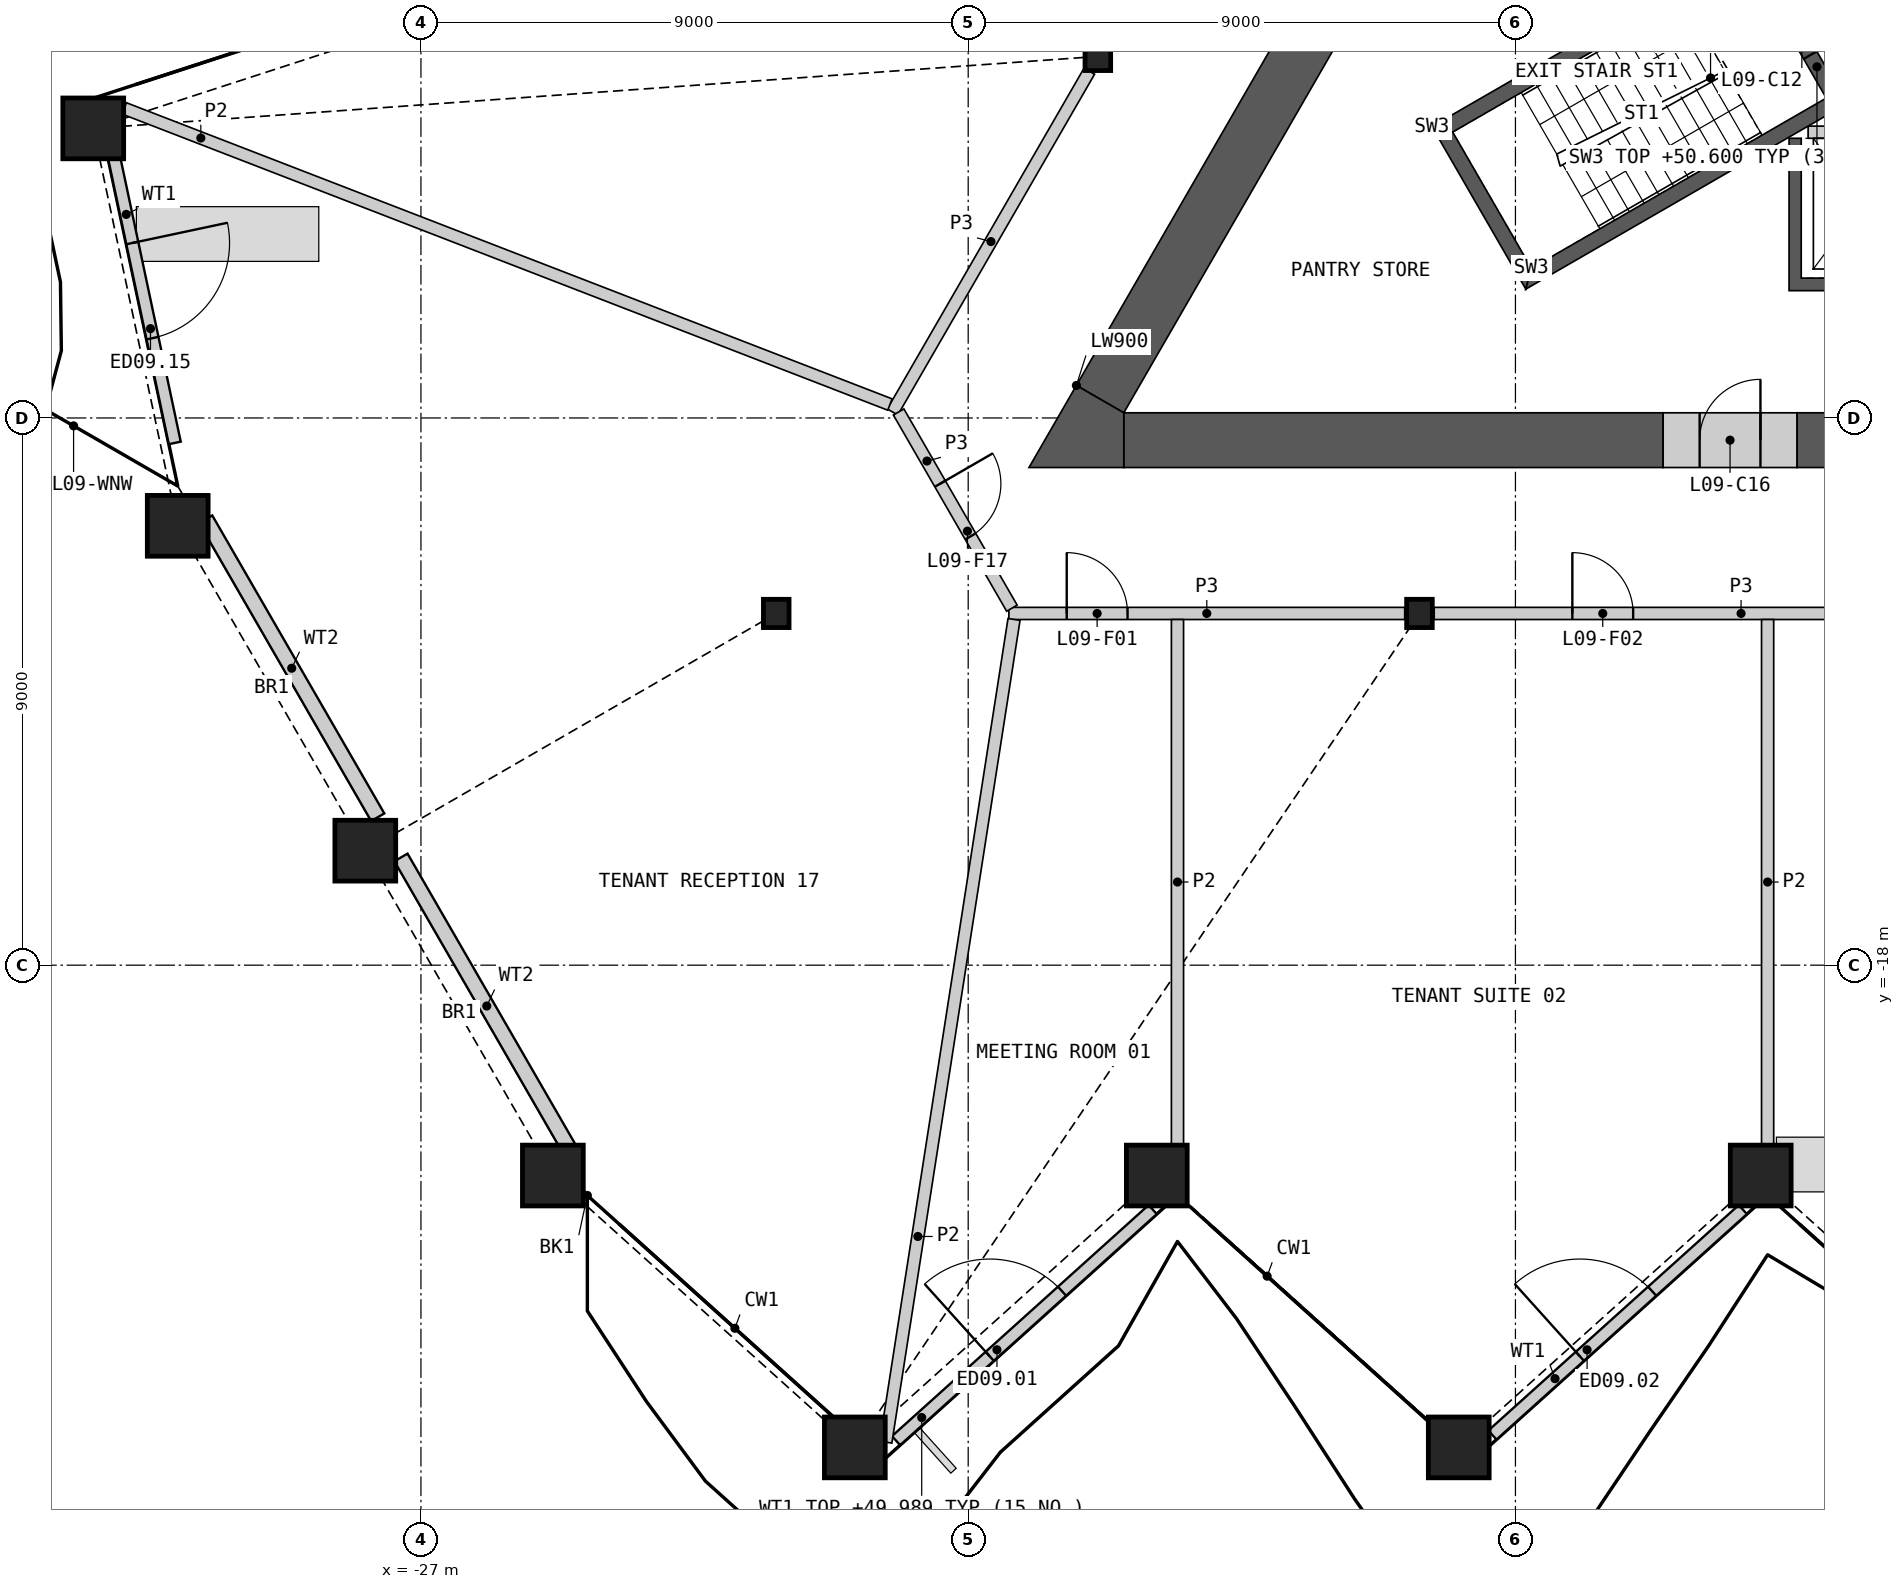
"""IFC4 building model, lengths in metres.
Left out: names, types, materials, properties, quantities, classifications, styles, units other than length and angle.
Written with IfcOpenShell. Run it as: python <this file> out.ifc"""

import sys

from ifc_helpers import new_model, si_unit, direction, frame, frame_2d, origin, origin_2d, place, context, subcontext, project, spatial, polyline, rectangle, hollow_rectangle, i_section, outline, extrude, element, fill, save


model = new_model("IFC4")
c1 = context("Model", 3, precision=1e-05, world=origin(), true_north=direction((0.0, 1.0)))
c2 = subcontext(c1, "Body", "Model", "MODEL_VIEW")
j1 = project(units=[si_unit("LENGTHUNIT", "METRE"), si_unit("PLANEANGLEUNIT", "RADIAN")], contexts=[c1])
p1 = place(None, origin())
s1 = spatial("IfcSite", under=j1, at=p1, CompositionType="ELEMENT")
p2 = place(p1, origin())
s2 = spatial("IfcBuilding", under=s1, at=p2, CompositionType="ELEMENT")
p3 = place(p2, frame((0.0, 0.0, 46.8)))
s3 = spatial("IfcBuildingStorey", under=s2, at=p3, CompositionType="ELEMENT", Elevation=46.8)
for number, where, z_axis, x_axis in (
    (1, (-24.83, -21.46, 0.0), (0.0, 0.0, 1.0), (1.0, 0.0, 0.0)),
    (2, (-19.864, -25.931, 0.0), (0.0, 0.0, 1.0), (1.0, 0.0, 0.0)),
    (3, (-14.898, -21.46, 0.0), (0.0, 0.0, 1.0), (1.0, 0.0, 0.0)),
    (4, (-9.932, -25.931, 0.0), (0.0, 0.0, 1.0), (1.0, 0.0, 0.0)),
    (5, (-4.966, -21.46, 0.0), (0.0, 0.0, 1.0), (1.0, 0.0, 0.0)),
    (6, (-32.389, -4.237, 0.0), (0.0, 0.0, 1.0), (1.0, 0.0, 0.0)),
    (7, (-31.0, -10.774, 0.0), (0.0, 0.0, 1.0), (1.0, 0.0, 0.0)),
    (8, (-27.915, -16.117, 0.0), (0.0, 0.0, 1.0), (1.0, 0.0, 0.0)),
):
    element("IfcColumn", number, at=place(p3, frame(where, z_axis=z_axis, x_axis=x_axis)), inside=s3, PredefinedType="COLUMN", context=c2, shape_type="SweptSolid", body=[
        extrude(hollow_rectangle(XDim=1.0, YDim=1.0, WallThickness=0.07, at=origin_2d()), origin(), (0.0, 0.0, 1.0), 4.2),
    ])
for number, where, z_axis, x_axis in (
    (9, (-15.868, -3.054, 0.0), (0.0, 0.0, 1.0), (1.0, 0.0, 0.0)),
    (10, (-21.157, -12.215, 0.0), (0.0, 0.0, 1.0), (1.0, 0.0, 0.0)),
    (11, (-10.578, -12.215, 0.0), (0.0, 0.0, 1.0), (1.0, 0.0, 0.0)),
):
    element("IfcColumn", number, at=place(p3, frame(where, z_axis=z_axis, x_axis=x_axis)), inside=s3, PredefinedType="COLUMN", context=c2, shape_type="SweptSolid", body=[
        extrude(i_section(OverallWidth=0.421, OverallDepth=0.465, WebThickness=0.045, FlangeThickness=0.072, at=origin_2d()), origin(), (0.0, 0.0, 1.0), 4.2),
    ])
p4 = place(p3, frame((-19.187, -25.82, 0.0), z_axis=(0.0, 0.0, 1.0), x_axis=(0.743142396166, 0.669133304373, 0.0)))
e12 = element("IfcWall", 12, at=p4, inside=s3, PredefinedType="SOLIDWALL", context=c2, shape_type="SweptSolid", body=[
    extrude(rectangle(XDim=5.68, YDim=0.2, at=frame_2d((2.84, 0.0))), origin(), (0.0, 0.0, 1.0), 3.189),
])
p5 = place(p4, frame((2.073, 0.0, 0.0)))
e13 = element("IfcOpeningElement", 13, at=p5, cuts=e12, PredefinedType="OPENING", context=c2, shape_type="SweptSolid", body=[
    extrude(rectangle(XDim=1.6, YDim=2.4, at=frame_2d((0.8, 1.2))), frame((0.0, 0.11, 0.0), z_axis=(0.0, -1.0, 0.0), x_axis=(1.0, 0.0, 0.0)), (0.0, 0.0, 1.0), 0.22),
])
p6 = place(p3, frame((-9.379, -25.728, 0.0), z_axis=(0.0, 0.0, 1.0), x_axis=(0.743160522465, 0.669113172677, 0.0)))
e14 = element("IfcWall", 14, at=p6, inside=s3, PredefinedType="SOLIDWALL", context=c2, shape_type="SweptSolid", body=[
    extrude(rectangle(XDim=5.542, YDim=0.2, at=frame_2d((2.771, 0.0))), origin(), (0.0, 0.0, 1.0), 3.189),
])
p7 = place(p6, frame((1.935, 0.0, 0.0)))
e15 = element("IfcOpeningElement", 15, at=p7, cuts=e14, PredefinedType="OPENING", context=c2, shape_type="SweptSolid", body=[
    extrude(rectangle(XDim=1.6, YDim=2.4, at=frame_2d((0.8, 1.2))), frame((0.0, 0.11, 0.0), z_axis=(0.0, -1.0, 0.0), x_axis=(1.0, 0.0, 0.0)), (0.0, 0.0, 1.0), 0.22),
])
p8 = place(p3, frame((-32.114, -4.399, 0.0), z_axis=(0.0, 0.0, 1.0), x_axis=(0.207931126702, -0.978143469307, 0.0)))
e16 = element("IfcWall", 16, at=p8, inside=s3, PredefinedType="SOLIDWALL", context=c2, shape_type="SweptSolid", body=[
    extrude(rectangle(XDim=5.124, YDim=0.2, at=frame_2d((2.562, 0.0))), origin(), (0.0, 0.0, 1.0), 3.189),
])
p9 = place(p8, frame((1.762, 0.0, 0.0)))
e17 = element("IfcOpeningElement", 17, at=p9, cuts=e16, PredefinedType="OPENING", context=c2, shape_type="SweptSolid", body=[
    extrude(rectangle(XDim=1.6, YDim=2.4, at=frame_2d((0.8, 1.2))), frame((0.0, 0.11, 0.0), z_axis=(0.0, -1.0, 0.0), x_axis=(1.0, 0.0, 0.0)), (0.0, 0.0, 1.0), 0.22),
])
p10 = place(p3, frame((-30.54, -10.665, 0.0), z_axis=(0.0, 0.0, 1.0), x_axis=(0.499985074313, -0.866034020963, 0.0)))
e18 = element("IfcWall", 18, at=p10, inside=s3, PredefinedType="SOLIDWALL", context=c2, shape_type="SweptSolid", body=[
    extrude(rectangle(XDim=5.66, YDim=0.25, at=frame_2d((2.83, 0.0))), origin(), (0.0, 0.0, 1.0), 3.189),
])
p11 = place(p3, frame((-27.329, -16.228, 0.0), z_axis=(0.0, 0.0, 1.0), x_axis=(0.49999579099, -0.866027833844, 0.0)))
e19 = element("IfcWall", 19, at=p11, inside=s3, PredefinedType="SOLIDWALL", context=c2, shape_type="SweptSolid", body=[
    extrude(rectangle(XDim=5.644, YDim=0.25, at=frame_2d((2.822, 0.0))), origin(), (0.0, 0.0, 1.0), 3.189),
])
p12 = place(p3, origin())
e20 = element("IfcWall", 20, at=p12, inside=s3, PredefinedType="SHEAR", context=c2, shape_type="SweptSolid", body=[
    extrude(outline(polyline([(4.5, -4.4), (4.5, -6.906), (-4.5, -6.906), (-4.5, -4.4), (-4.3, -4.4), (-4.3, -6.7), (-2.3, -6.7), (-2.3, -4.4), (-2.1, -4.4), (-2.1, -6.7), (-0.1, -6.7), (-0.1, -4.4), (0.1, -4.4), (0.1, -6.7), (2.1, -6.7), (2.1, -4.4), (2.3, -4.4), (2.3, -6.7), (4.3, -6.7), (4.3, -4.4), (4.5, -4.4)])), origin(), (0.0, 0.0, 1.0), 3.8),
])
p13 = place(p3, frame((-4.187, -4.3, 0.0), z_axis=(0.0, 0.0, 1.0), x_axis=(1.0, 0.0, 0.0)))
e21 = element("IfcWall", 21, at=p13, inside=s3, PredefinedType="SOLIDWALL", context=c2, shape_type="SweptSolid", body=[
    extrude(rectangle(XDim=8.373, YDim=0.2, at=frame_2d((4.187, 0.0))), origin(), (0.0, 0.0, 1.0), 3.8),
])
p14 = place(p13, frame((0.287, 0.0, 0.0)))
e22 = element("IfcOpeningElement", 22, at=p14, cuts=e21, PredefinedType="OPENING", context=c2, shape_type="SweptSolid", body=[
    extrude(rectangle(XDim=1.2, YDim=2.1, at=frame_2d((0.6, 1.05))), frame((0.0, 0.11, 0.0), z_axis=(0.0, -1.0, 0.0), x_axis=(1.0, 0.0, 0.0)), (0.0, 0.0, 1.0), 0.22),
])
p15 = place(p13, frame((2.387, 0.0, 0.0)))
e23 = element("IfcOpeningElement", 23, at=p15, cuts=e21, PredefinedType="OPENING", context=c2, shape_type="SweptSolid", body=[
    extrude(rectangle(XDim=1.4, YDim=2.1, at=frame_2d((0.7, 1.05))), frame((0.0, 0.11, 0.0), z_axis=(0.0, -1.0, 0.0), x_axis=(1.0, 0.0, 0.0)), (0.0, 0.0, 1.0), 0.22),
])
p16 = place(p13, frame((4.737, 0.0, 0.0)))
e24 = element("IfcOpeningElement", 24, at=p16, cuts=e21, PredefinedType="OPENING", context=c2, shape_type="SweptSolid", body=[
    extrude(rectangle(XDim=1.1, YDim=2.1, at=frame_2d((0.55, 1.05))), frame((0.0, 0.11, 0.0), z_axis=(0.0, -1.0, 0.0), x_axis=(1.0, 0.0, 0.0)), (0.0, 0.0, 1.0), 0.22),
])
p17 = place(p13, frame((6.887, 0.0, 0.0)))
e25 = element("IfcOpeningElement", 25, at=p17, cuts=e21, PredefinedType="OPENING", context=c2, shape_type="SweptSolid", body=[
    extrude(rectangle(XDim=1.2, YDim=2.1, at=frame_2d((0.6, 1.05))), frame((0.0, 0.11, 0.0), z_axis=(0.0, -1.0, 0.0), x_axis=(1.0, 0.0, 0.0)), (0.0, 0.0, 1.0), 0.22),
])
p18 = place(p3, origin())
e26 = element("IfcWall", 26, at=p18, inside=s3, PredefinedType="SHEAR", context=c2, shape_type="SweptSolid", body=[
    extrude(outline(polyline([(-5.307, -1.281), (-10.374, -4.206), (-10.032, -4.298), (-5.182, -1.498), (-5.307, -1.281)])), origin(), (0.0, 0.0, 1.0), 3.8),
])
p19 = place(p3, origin())
e27 = element("IfcWall", 27, at=p19, inside=s3, PredefinedType="SHEAR", context=c2, shape_type="SweptSolid", body=[
    extrude(outline(polyline([(-10.374, -4.206), (-8.83, -6.881), (-8.738, -6.539), (-10.032, -4.298), (-10.374, -4.206)])), origin(), (0.0, 0.0, 1.0), 3.8),
])
p20 = place(p3, origin())
e28 = element("IfcWall", 28, at=p20, inside=s3, PredefinedType="SHEAR", context=c2, shape_type="SweptSolid", body=[
    extrude(outline(polyline([(-8.738, -6.539), (-8.83, -6.881), (-3.763, -3.956), (-3.888, -3.739), (-8.738, -6.539)])), origin(), (0.0, 0.0, 1.0), 3.8),
])
p21 = place(p3, frame((-5.199, -1.219, 0.0), z_axis=(0.0, 0.0, 1.0), x_axis=(0.499982516597, -0.866035497597, 0.0)))
e29 = element("IfcWall", 29, at=p21, inside=s3, PredefinedType="SHEAR", context=c2, shape_type="SweptSolid", body=[
    extrude(rectangle(XDim=3.088, YDim=0.25, at=frame_2d((1.544, 0.0))), origin(), (0.0, 0.0, 1.0), 3.8),
])
p22 = place(p21, frame((0.994, 0.0, 0.0)))
e30 = element("IfcOpeningElement", 30, at=p22, cuts=e29, PredefinedType="OPENING", context=c2, shape_type="SweptSolid", body=[
    extrude(rectangle(XDim=1.1, YDim=2.1, at=frame_2d((0.55, 1.05))), frame((0.0, 0.135, 0.0), z_axis=(0.0, -1.0, 0.0), x_axis=(1.0, 0.0, 0.0)), (0.0, 0.0, 1.0), 0.27),
])
p23 = place(p3, frame((-4.371, -9.365, 0.0), z_axis=(0.0, 0.0, 1.0), x_axis=(1.0, 0.0, 0.0)))
e31 = element("IfcWall", 31, at=p23, inside=s3, PredefinedType="SHEAR", context=c2, shape_type="SweptSolid", body=[
    extrude(rectangle(XDim=15.55, YDim=0.9, at=frame_2d((7.775, 0.0))), origin(), (0.0, 0.0, 1.0), 3.8),
])
p24 = place(p3, frame((-15.441, -9.365, 0.0), z_axis=(0.0, 0.0, 1.0), x_axis=(1.0, 0.0, 0.0)))
e32 = element("IfcWall", 32, at=p24, inside=s3, PredefinedType="SHEAR", context=c2, shape_type="SweptSolid", body=[
    extrude(rectangle(XDim=8.871, YDim=0.9, at=frame_2d((4.435, 0.0))), origin(), (0.0, 0.0, 1.0), 3.8),
])
p25 = place(p3, frame((-10.31, 0.872, 0.0), z_axis=(0.0, 0.0, 1.0), x_axis=(-0.499991697393, -0.866030197244, 0.0)))
e33 = element("IfcWall", 33, at=p25, inside=s3, PredefinedType="SHEAR", context=c2, shape_type="SweptSolid", body=[
    extrude(rectangle(XDim=11.041, YDim=0.9, at=frame_2d((5.521, 0.0))), origin(), (0.0, 0.0, 1.0), 3.8),
])
p26 = place(p3, origin())
e34 = element("IfcWall", 34, at=p26, inside=s3, PredefinedType="SHEAR", context=c2, shape_type="SweptSolid", body=[
    extrude(outline(polyline([(-16.221, -8.465), (-15.441, -8.915), (-15.441, -9.815), (-17.0, -9.815), (-16.221, -8.465)])), origin(), (0.0, 0.0, 1.0), 3.8),
])
p27 = place(p3, frame((-6.571, -9.365, 0.0), z_axis=(0.0, 0.0, 1.0), x_axis=(1.0, 0.0, 0.0)))
e35 = element("IfcWall", 35, at=p27, inside=s3, PredefinedType="SHEAR", context=c2, shape_type="SweptSolid", body=[
    extrude(rectangle(XDim=2.2, YDim=0.9, at=frame_2d((1.1, 0.0))), origin(), (0.0, 0.0, 1.0), 3.8),
])
p28 = place(p27, frame((0.6, 0.0, 0.0)))
e36 = element("IfcOpeningElement", 36, at=p28, cuts=e35, PredefinedType="OPENING", context=c2, shape_type="SweptSolid", body=[
    extrude(rectangle(XDim=1.0, YDim=2.1, at=frame_2d((0.5, 1.05))), frame((0.0, 0.46, 0.0), z_axis=(0.0, -1.0, 0.0), x_axis=(1.0, 0.0, 0.0)), (0.0, 0.0, 1.0), 0.92),
])
p29 = place(p3, frame((-10.336, -12.215, 0.0), z_axis=(0.0, 0.0, 1.0), x_axis=(1.0, 0.0, 0.0)))
e37 = element("IfcWall", 37, at=p29, inside=s3, PredefinedType="PARTITIONING", context=c2, shape_type="SweptSolid", body=[
    extrude(rectangle(XDim=10.094, YDim=0.2, at=frame_2d((5.047, 0.0))), origin(), (0.0, 0.0, 1.0), 3.8),
])
p30 = place(p29, frame((2.272, 0.0, 0.0)))
e38 = element("IfcOpeningElement", 38, at=p30, cuts=e37, PredefinedType="OPENING", context=c2, shape_type="SweptSolid", body=[
    extrude(rectangle(XDim=1.0, YDim=2.1, at=frame_2d((0.5, 1.05))), frame((0.0, 0.11, 0.0), z_axis=(0.0, -1.0, 0.0), x_axis=(1.0, 0.0, 0.0)), (0.0, 0.0, 1.0), 0.22),
])
p31 = place(p3, frame((-17.331, -12.215, 0.0), z_axis=(0.0, 0.0, 1.0), x_axis=(1.0, 0.0, 0.0)))
e39 = element("IfcWall", 39, at=p31, inside=s3, PredefinedType="PARTITIONING", context=c2, shape_type="SweptSolid", body=[
    extrude(rectangle(XDim=6.51, YDim=0.2, at=frame_2d((3.255, 0.0))), origin(), (0.0, 0.0, 1.0), 3.8),
])
p32 = place(p31, frame((0.951, 0.0, 0.0)))
e40 = element("IfcOpeningElement", 40, at=p32, cuts=e39, PredefinedType="OPENING", context=c2, shape_type="SweptSolid", body=[
    extrude(rectangle(XDim=1.0, YDim=2.1, at=frame_2d((0.5, 1.05))), frame((0.0, 0.11, 0.0), z_axis=(0.0, -1.0, 0.0), x_axis=(1.0, 0.0, 0.0)), (0.0, 0.0, 1.0), 0.22),
])
p33 = place(p3, frame((-19.244, -8.902, 0.0), z_axis=(0.0, 0.0, 1.0), x_axis=(0.499984737558, 0.86603421538, 0.0)))
e41 = element("IfcWall", 41, at=p33, inside=s3, PredefinedType="PARTITIONING", context=c2, shape_type="SweptSolid", body=[
    extrude(rectangle(XDim=6.473, YDim=0.2, at=frame_2d((3.236, 0.0))), origin(), (0.0, 0.0, 1.0), 3.8),
])
p34 = place(p3, frame((-19.144, -8.902, 0.0), z_axis=(0.0, 0.0, 1.0), x_axis=(0.499958791762, -0.866049194065, 0.0)))
e42 = element("IfcWall", 42, at=p34, inside=s3, PredefinedType="PARTITIONING", context=c2, shape_type="SweptSolid", body=[
    extrude(rectangle(XDim=3.726, YDim=0.2, at=frame_2d((1.863, 0.0))), origin(), (0.0, 0.0, 1.0), 3.8),
])
p35 = place(p34, frame((1.363, 0.0, 0.0)))
e43 = element("IfcOpeningElement", 43, at=p35, cuts=e42, PredefinedType="OPENING", context=c2, shape_type="SweptSolid", body=[
    extrude(rectangle(XDim=1.0, YDim=2.1, at=frame_2d((0.5, 1.05))), frame((0.0, 0.11, 0.0), z_axis=(0.0, -1.0, 0.0), x_axis=(1.0, 0.0, 0.0)), (0.0, 0.0, 1.0), 0.22),
])
p36 = place(p3, frame((-19.354, -25.845, 0.0), z_axis=(0.0, 0.0, 1.0), x_axis=(0.153927101979, 0.98808220674, 0.0)))
e44 = element("IfcWall", 44, at=p36, inside=s3, PredefinedType="PARTITIONING", context=c2, shape_type="SweptSolid", body=[
    extrude(rectangle(XDim=13.694, YDim=0.2, at=frame_2d((6.847, 0.0))), origin(), (0.0, 0.0, 1.0), 2.885),
])
p37 = place(p3, frame((-31.879, -3.908, 0.0), z_axis=(0.0, 0.0, 1.0), x_axis=(0.932669586354, -0.360731815467, 0.0)))
e45 = element("IfcWall", 45, at=p37, inside=s3, PredefinedType="PARTITIONING", context=c2, shape_type="SweptSolid", body=[
    extrude(rectangle(XDim=13.501, YDim=0.2, at=frame_2d((6.75, 0.0))), origin(), (0.0, 0.0, 1.0), 2.885),
])
for number, where, z_axis, x_axis in (
    (46, (-14.558, -20.95, 0.0), (0.0, 0.0, 1.0), (0.0, 1.0, 0.0)),
    (47, (-4.853, -20.95, 0.0), (0.0, 0.0, 1.0), (0.0, 1.0, 0.0)),
):
    element("IfcWall", number, at=place(p3, frame(where, z_axis=z_axis, x_axis=x_axis)), inside=s3, PredefinedType="PARTITIONING", context=c2, shape_type="SweptSolid", body=[
        extrude(rectangle(XDim=8.635, YDim=0.2, at=frame_2d((4.317, 0.0))), origin(), (0.0, 0.0, 1.0), 2.885),
    ])
p38 = place(p5, origin())
e48 = element("IfcDoor", 48, at=p38, inside=s3, OperationType="DOUBLE_DOOR_SINGLE_SWING", PredefinedType="DOOR", context=c2, shape_type="SweptSolid", body=[
    extrude(rectangle(XDim=1.6, YDim=2.4, at=frame_2d((0.8, 1.2))), frame((0.0, 0.025, 0.0), z_axis=(0.0, -1.0, 0.0), x_axis=(1.0, 0.0, 0.0)), (0.0, 0.0, 1.0), 0.05),
])
fill(e13, e48)
p39 = place(p7, origin())
e49 = element("IfcDoor", 49, at=p39, inside=s3, OperationType="DOUBLE_DOOR_SINGLE_SWING", PredefinedType="DOOR", context=c2, shape_type="SweptSolid", body=[
    extrude(rectangle(XDim=1.6, YDim=2.4, at=frame_2d((0.8, 1.2))), frame((0.0, 0.025, 0.0), z_axis=(0.0, -1.0, 0.0), x_axis=(1.0, 0.0, 0.0)), (0.0, 0.0, 1.0), 0.05),
])
fill(e15, e49)
p40 = place(p9, origin())
e50 = element("IfcDoor", 50, at=p40, inside=s3, OperationType="DOUBLE_DOOR_SINGLE_SWING", PredefinedType="DOOR", context=c2, shape_type="SweptSolid", body=[
    extrude(rectangle(XDim=1.6, YDim=2.4, at=frame_2d((0.8, 1.2))), frame((0.0, 0.025, 0.0), z_axis=(0.0, -1.0, 0.0), x_axis=(1.0, 0.0, 0.0)), (0.0, 0.0, 1.0), 0.05),
])
fill(e17, e50)
p41 = place(p22, origin())
e51 = element("IfcDoor", 51, at=p41, inside=s3, OperationType="SINGLE_SWING_LEFT", PredefinedType="DOOR", context=c2, shape_type="SweptSolid", body=[
    extrude(rectangle(XDim=1.1, YDim=2.1, at=frame_2d((0.55, 1.05))), frame((0.0, 0.025, 0.0), z_axis=(0.0, -1.0, 0.0), x_axis=(1.0, 0.0, 0.0)), (0.0, 0.0, 1.0), 0.05),
])
fill(e30, e51)
p42 = place(p28, origin())
e52 = element("IfcDoor", 52, at=p42, inside=s3, OperationType="SINGLE_SWING_RIGHT", PredefinedType="DOOR", context=c2, shape_type="SweptSolid", body=[
    extrude(rectangle(XDim=1.0, YDim=2.1, at=frame_2d((0.5, 1.05))), frame((0.0, 0.205, 0.0), z_axis=(0.0, -1.0, 0.0), x_axis=(1.0, 0.0, 0.0)), (0.0, 0.0, 1.0), 0.05),
])
fill(e36, e52)
p43 = place(p32, origin())
e53 = element("IfcDoor", 53, at=p43, inside=s3, OperationType="SINGLE_SWING_LEFT", PredefinedType="DOOR", context=c2, shape_type="SweptSolid", body=[
    extrude(rectangle(XDim=1.0, YDim=2.1, at=frame_2d((0.5, 1.05))), frame((0.0, 0.025, 0.0), z_axis=(0.0, -1.0, 0.0), x_axis=(1.0, 0.0, 0.0)), (0.0, 0.0, 1.0), 0.05),
])
fill(e40, e53)
p44 = place(p30, origin())
e54 = element("IfcDoor", 54, at=p44, inside=s3, OperationType="SINGLE_SWING_LEFT", PredefinedType="DOOR", context=c2, shape_type="SweptSolid", body=[
    extrude(rectangle(XDim=1.0, YDim=2.1, at=frame_2d((0.5, 1.05))), frame((0.0, 0.025, 0.0), z_axis=(0.0, -1.0, 0.0), x_axis=(1.0, 0.0, 0.0)), (0.0, 0.0, 1.0), 0.05),
])
fill(e38, e54)
p45 = place(p35, origin())
e55 = element("IfcDoor", 55, at=p45, inside=s3, OperationType="SINGLE_SWING_LEFT", PredefinedType="DOOR", context=c2, shape_type="SweptSolid", body=[
    extrude(rectangle(XDim=1.0, YDim=2.1, at=frame_2d((0.5, 1.05))), frame((0.0, 0.025, 0.0), z_axis=(0.0, -1.0, 0.0), x_axis=(1.0, 0.0, 0.0)), (0.0, 0.0, 1.0), 0.05),
])
fill(e43, e55)
save(model, sys.argv[1])
